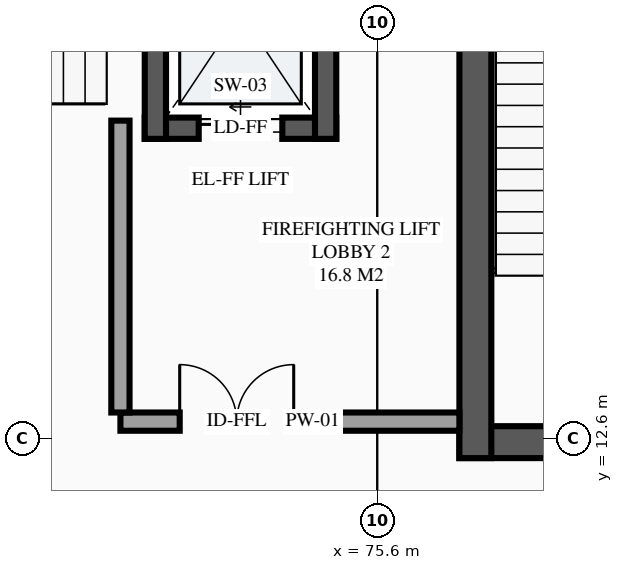
"""IFC4 building model, lengths in metres.
Left out: names, types, materials, properties, quantities, classifications, styles, units other than length and angle.
Written with IfcOpenShell. Run it as: python <this file> out.ifc"""

import sys

from ifc_helpers import new_model, si_unit, direction, frame, frame_2d, origin, place, context, subcontext, project, spatial, rectangle, extrude, element, fill, save


model = new_model("IFC4")
c1 = context("Model", 3, precision=1e-05, world=origin(), true_north=direction((0.0, 1.0)))
c2 = subcontext(c1, "Body", "Model", "MODEL_VIEW")
j1 = project(units=[si_unit("LENGTHUNIT", "METRE"), si_unit("PLANEANGLEUNIT", "RADIAN")], contexts=[c1])
p1 = place(None, origin())
s1 = spatial("IfcSite", under=j1, at=p1, CompositionType="ELEMENT")
p2 = place(p1, origin())
s2 = spatial("IfcBuilding", under=s1, at=p2, CompositionType="ELEMENT")
p3 = place(p2, origin())
s3 = spatial("IfcBuildingStorey", under=s2, at=p3, CompositionType="ELEMENT", Elevation=0.0)
p4 = place(p3, frame((72.54, 16.68, 0.0), z_axis=(0.0, 0.0, 1.0), x_axis=(1.0, 0.0, 0.0)))
e1 = element("IfcWall", 1, at=p4, inside=s3, PredefinedType="SHEAR", context=c2, shape_type="SweptSolid", body=[
    extrude(rectangle(XDim=2.52, YDim=0.28, at=frame_2d((1.26, 0.0))), origin(), (0.0, 0.0, 1.0), 5.4),
])
p5 = place(p4, frame((0.71, 0.0, 0.0)))
e2 = element("IfcOpeningElement", 2, at=p5, cuts=e1, PredefinedType="OPENING", context=c2, shape_type="SweptSolid", body=[
    extrude(rectangle(XDim=1.1, YDim=2.2, at=frame_2d((0.55, 1.1))), frame((0.0, 0.15, 0.0), z_axis=(0.0, -1.0, 0.0), x_axis=(1.0, 0.0, 0.0)), (0.0, 0.0, 1.0), 0.3),
])
for number, where, z_axis, x_axis in (
    (3, (74.92, 16.54, 0.0), (0.0, 0.0, 1.0), (0.0, 1.0, 0.0)),
    (4, (72.68, 19.86, 0.0), (0.0, 0.0, 1.0), (0.0, -1.0, 0.0)),
):
    element("IfcWall", number, at=place(p3, frame(where, z_axis=z_axis, x_axis=x_axis)), inside=s3, PredefinedType="SHEAR", context=c2, shape_type="SweptSolid", body=[
        extrude(rectangle(XDim=3.32, YDim=0.28, at=frame_2d((1.66, 0.0))), origin(), (0.0, 0.0, 1.0), 5.4),
    ])
p6 = place(p3, frame((76.68, 12.55, 0.0), z_axis=(0.0, 0.0, 1.0), x_axis=(1.0, 0.0, 0.0)))
e5 = element("IfcWall", 5, at=p6, inside=s3, PredefinedType="SHEAR", context=c2, shape_type="SweptSolid", body=[
    extrude(rectangle(XDim=5.44, YDim=0.42, at=frame_2d((2.72, 0.0))), origin(), (0.0, 0.0, 1.0), 5.4),
])
p7 = place(p6, frame((3.295, 0.0, 0.0), z_axis=(0.0, 0.0, 1.0), x_axis=(-1.0, 0.0, 0.0)))
e6 = element("IfcOpeningElement", 6, at=p7, cuts=e5, PredefinedType="OPENING", context=c2, shape_type="SweptSolid", body=[
    extrude(rectangle(XDim=1.15, YDim=2.15, at=frame_2d((0.575, 1.075))), frame((0.0, 0.22, 0.0), z_axis=(0.0, -1.0, 0.0), x_axis=(1.0, 0.0, 0.0)), (0.0, 0.0, 1.0), 0.44),
])
p8 = place(p3, frame((76.89, 21.42, 0.0), z_axis=(0.0, 0.0, 1.0), x_axis=(0.0, -1.0, 0.0)))
e7 = element("IfcWall", 7, at=p8, inside=s3, PredefinedType="SHEAR", context=c2, shape_type="SweptSolid", body=[
    extrude(rectangle(XDim=9.08, YDim=0.42, at=frame_2d((4.54, 0.0))), origin(), (0.0, 0.0, 1.0), 5.4),
])
p9 = place(p3, frame((72.22, 12.82, 0.0), z_axis=(0.0, 0.0, 1.0), x_axis=(1.0, 0.0, 0.0)))
e8 = element("IfcWall", 8, at=p9, inside=s3, PredefinedType="PARTITIONING", context=c2, shape_type="SweptSolid", body=[
    extrude(rectangle(XDim=4.46, YDim=0.24, at=frame_2d((2.23, 0.0))), origin(), (0.0, 0.0, 1.0), 5.135),
])
p10 = place(p9, frame((0.78, 0.0, 0.0)))
e9 = element("IfcOpeningElement", 9, at=p10, cuts=e8, PredefinedType="OPENING", context=c2, shape_type="SweptSolid", body=[
    extrude(rectangle(XDim=1.5, YDim=2.15, at=frame_2d((0.75, 1.075))), frame((0.0, 0.13, 0.0), z_axis=(0.0, -1.0, 0.0), x_axis=(1.0, 0.0, 0.0)), (0.0, 0.0, 1.0), 0.26),
])
p11 = place(p3, frame((72.22, 12.94, 0.0), z_axis=(0.0, 0.0, 1.0), x_axis=(0.0, 1.0, 0.0)))
e10 = element("IfcWall", 10, at=p11, inside=s3, PredefinedType="PARTITIONING", context=c2, shape_type="SweptSolid", body=[
    extrude(rectangle(XDim=3.84, YDim=0.24, at=frame_2d((1.92, 0.0))), origin(), (0.0, 0.0, 1.0), 5.135),
])
p12 = place(p5, origin())
e11 = element("IfcDoor", 11, at=p12, inside=s3, OperationType="SLIDING_TO_LEFT", PredefinedType="DOOR", context=c2, shape_type="SweptSolid", body=[
    extrude(rectangle(XDim=1.1, YDim=2.2, at=frame_2d((0.55, 1.1))), frame((0.0, 0.025, 0.0), z_axis=(0.0, -1.0, 0.0), x_axis=(1.0, 0.0, 0.0)), (0.0, 0.0, 1.0), 0.05),
])
fill(e2, e11)
p13 = place(p10, origin())
e12 = element("IfcDoor", 12, at=p13, inside=s3, OperationType="DOUBLE_DOOR_SINGLE_SWING", PredefinedType="DOOR", context=c2, shape_type="SweptSolid", body=[
    extrude(rectangle(XDim=1.5, YDim=2.15, at=frame_2d((0.75, 1.075))), frame((0.0, 0.025, 0.0), z_axis=(0.0, -1.0, 0.0), x_axis=(1.0, 0.0, 0.0)), (0.0, 0.0, 1.0), 0.05),
])
fill(e9, e12)
save(model, sys.argv[1])
